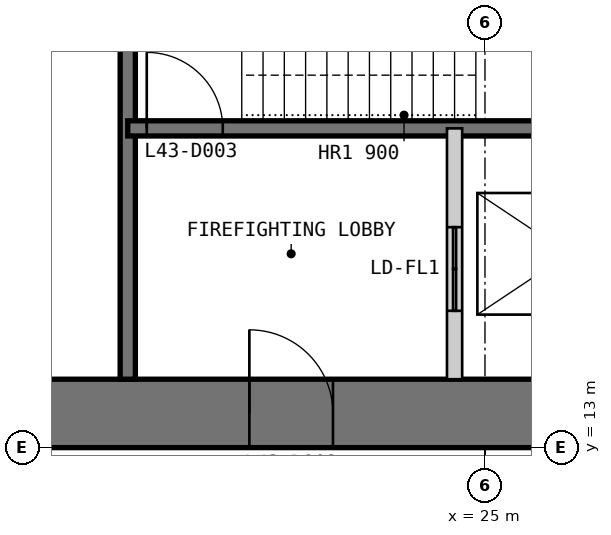
"""IFC4 building model, lengths in metres.
Left out: names, types, materials, properties, quantities, classifications, styles, units other than length and angle.
Written with IfcOpenShell. Run it as: python <this file> out.ifc"""

import sys

from ifc_helpers import new_model, si_unit, direction, frame, frame_2d, origin, place, context, subcontext, project, spatial, polyline, rectangle, outline, extrude, element, fill, save


model = new_model("IFC4")
c1 = context("Model", 3, precision=1e-05, world=origin(), true_north=direction((0.0, 1.0)))
c2 = subcontext(c1, "Body", "Model", "MODEL_VIEW")
j1 = project(units=[si_unit("LENGTHUNIT", "METRE"), si_unit("PLANEANGLEUNIT", "RADIAN")], contexts=[c1])
p1 = place(None, origin())
s1 = spatial("IfcSite", under=j1, at=p1, CompositionType="ELEMENT")
p2 = place(p1, origin())
s2 = spatial("IfcBuilding", under=s1, at=p2, CompositionType="ELEMENT")
p3 = place(p2, frame((0.0, 0.0, 185.8)))
s3 = spatial("IfcBuildingStorey", under=s2, at=p3, CompositionType="ELEMENT", Elevation=185.8)
p4 = place(p3, frame((13.0, 13.45, 0.0), z_axis=(0.0, 0.0, 1.0), x_axis=(1.0, 0.0, 0.0)))
e1 = element("IfcWall", 1, at=p4, inside=s3, PredefinedType="SHEAR", context=c2, shape_type="SweptSolid", body=[
    extrude(outline(polyline([(0.0, -0.45), (24.0, -0.45), (23.1, 0.45), (0.9, 0.45), (0.0, -0.45)])), origin(), (0.0, 0.0, 1.0), 4.0),
])
p5 = place(p4, frame((4.9, 0.0, 0.0)))
e2 = element("IfcOpeningElement", 2, at=p5, cuts=e1, PredefinedType="OPENING", context=c2, shape_type="SweptSolid", body=[
    extrude(rectangle(XDim=1.0, YDim=2.2, at=frame_2d((0.5, 1.1))), frame((0.0, 0.46, 0.0), z_axis=(0.0, -1.0, 0.0), x_axis=(1.0, 0.0, 0.0)), (0.0, 0.0, 1.0), 0.92),
])
p6 = place(p4, frame((8.9, 0.0, 0.0)))
e3 = element("IfcOpeningElement", 3, at=p6, cuts=e1, PredefinedType="OPENING", context=c2, shape_type="SweptSolid", body=[
    extrude(rectangle(XDim=1.1, YDim=2.2, at=frame_2d((0.55, 1.1))), frame((0.0, 0.46, 0.0), z_axis=(0.0, -1.0, 0.0), x_axis=(1.0, 0.0, 0.0)), (0.0, 0.0, 1.0), 0.92),
])
p7 = place(p4, frame((15.05, 0.0, 0.0)))
e4 = element("IfcOpeningElement", 4, at=p7, cuts=e1, PredefinedType="OPENING", context=c2, shape_type="SweptSolid", body=[
    extrude(rectangle(XDim=0.9, YDim=2.2, at=frame_2d((0.45, 1.1))), frame((0.0, 0.46, 0.0), z_axis=(0.0, -1.0, 0.0), x_axis=(1.0, 0.0, 0.0)), (0.0, 0.0, 1.0), 0.92),
])
p8 = place(p4, frame((17.9, 0.0, 0.0)))
e5 = element("IfcOpeningElement", 5, at=p8, cuts=e1, PredefinedType="OPENING", context=c2, shape_type="SweptSolid", body=[
    extrude(rectangle(XDim=1.0, YDim=2.2, at=frame_2d((0.5, 1.1))), frame((0.0, 0.46, 0.0), z_axis=(0.0, -1.0, 0.0), x_axis=(1.0, 0.0, 0.0)), (0.0, 0.0, 1.0), 0.92),
])
p9 = place(p4, frame((21.4, 0.0, 0.0)))
e6 = element("IfcOpeningElement", 6, at=p9, cuts=e1, PredefinedType="OPENING", context=c2, shape_type="SweptSolid", body=[
    extrude(rectangle(XDim=1.0, YDim=2.2, at=frame_2d((0.5, 1.1))), frame((0.0, 0.46, 0.0), z_axis=(0.0, -1.0, 0.0), x_axis=(1.0, 0.0, 0.0)), (0.0, 0.0, 1.0), 0.92),
])
p10 = place(p3, frame((20.3, 13.9, 0.0), z_axis=(0.0, 0.0, 1.0), x_axis=(0.0, 1.0, 0.0)))
e7 = element("IfcWall", 7, at=p10, inside=s3, PredefinedType="SOLIDWALL", context=c2, shape_type="SweptSolid", body=[
    extrude(rectangle(XDim=16.1, YDim=0.2, at=frame_2d((8.05, 0.0))), origin(), (0.0, 0.0, 1.0), 3.8),
])
p11 = place(p10, frame((10.65, 0.0, 0.0)))
e8 = element("IfcOpeningElement", 8, at=p11, cuts=e7, PredefinedType="OPENING", context=c2, shape_type="SweptSolid", body=[
    extrude(rectangle(XDim=0.9, YDim=2.2, at=frame_2d((0.45, 1.1))), frame((0.0, 0.11, 0.0), z_axis=(0.0, -1.0, 0.0), x_axis=(1.0, 0.0, 0.0)), (0.0, 0.0, 1.0), 0.22),
])
p12 = place(p3, frame((20.3, 17.2, 0.0), z_axis=(0.0, 0.0, 1.0), x_axis=(1.0, 0.0, 0.0)))
e9 = element("IfcWall", 9, at=p12, inside=s3, PredefinedType="SOLIDWALL", context=c2, shape_type="SweptSolid", body=[
    extrude(rectangle(XDim=9.4, YDim=0.2, at=frame_2d((4.7, 0.0))), origin(), (0.0, 0.0, 1.0), 3.8),
])
p13 = place(p12, frame((0.25, 0.0, 0.0)))
e10 = element("IfcOpeningElement", 10, at=p13, cuts=e9, PredefinedType="OPENING", context=c2, shape_type="SweptSolid", body=[
    extrude(rectangle(XDim=1.0, YDim=2.2, at=frame_2d((0.5, 1.1))), frame((0.0, 0.11, 0.0), z_axis=(0.0, -1.0, 0.0), x_axis=(1.0, 0.0, 0.0)), (0.0, 0.0, 1.0), 0.22),
])
p14 = place(p3, frame((24.6, 13.9, 0.0), z_axis=(0.0, 0.0, 1.0), x_axis=(0.0, 1.0, 0.0)))
e11 = element("IfcWall", 11, at=p14, inside=s3, PredefinedType="PARTITIONING", context=c2, shape_type="SweptSolid", body=[
    extrude(rectangle(XDim=3.3, YDim=0.2, at=frame_2d((1.65, 0.0))), origin(), (0.0, 0.0, 1.0), 3.8),
])
p15 = place(p14, frame((0.9, 0.0, 0.0)))
e12 = element("IfcOpeningElement", 12, at=p15, cuts=e11, PredefinedType="OPENING", context=c2, shape_type="SweptSolid", body=[
    extrude(rectangle(XDim=1.1, YDim=2.2, at=frame_2d((0.55, 1.1))), frame((0.0, 0.11, 0.0), z_axis=(0.0, -1.0, 0.0), x_axis=(1.0, 0.0, 0.0)), (0.0, 0.0, 1.0), 0.22),
])
p16 = place(p6, origin())
e13 = element("IfcDoor", 13, at=p16, inside=s3, OperationType="SINGLE_SWING_LEFT", PredefinedType="DOOR", context=c2, shape_type="SweptSolid", body=[
    extrude(rectangle(XDim=1.1, YDim=2.2, at=frame_2d((0.55, 1.1))), frame((0.0, 0.025, 0.0), z_axis=(0.0, -1.0, 0.0), x_axis=(1.0, 0.0, 0.0)), (0.0, 0.0, 1.0), 0.05),
    extrude(outline(polyline([(0.0, 0.0), (0.04, 0.0), (0.04, 2.16), (1.06, 2.16), (1.06, 0.0), (1.1, 0.0), (1.1, 2.2), (0.0, 2.2), (0.0, 0.0)])), frame((0.0, 0.3, 0.0), z_axis=(0.0, -1.0, 0.0), x_axis=(1.0, 0.0, 0.0)), (0.0, 0.0, 1.0), 0.6),
])
fill(e3, e13)
p17 = place(p13, origin())
e14 = element("IfcDoor", 14, at=p17, inside=s3, OperationType="SINGLE_SWING_LEFT", PredefinedType="DOOR", context=c2, shape_type="SweptSolid", body=[
    extrude(rectangle(XDim=1.0, YDim=2.2, at=frame_2d((0.5, 1.1))), frame((0.0, 0.025, 0.0), z_axis=(0.0, -1.0, 0.0), x_axis=(1.0, 0.0, 0.0)), (0.0, 0.0, 1.0), 0.05),
])
fill(e10, e14)
p18 = place(p15, origin())
e15 = element("IfcDoor", 15, at=p18, inside=s3, OperationType="DOUBLE_DOOR_SLIDING", PredefinedType="DOOR", context=c2, shape_type="SweptSolid", body=[
    extrude(rectangle(XDim=1.1, YDim=2.2, at=frame_2d((0.55, 1.1))), frame((0.0, 0.025, 0.0), z_axis=(0.0, -1.0, 0.0), x_axis=(1.0, 0.0, 0.0)), (0.0, 0.0, 1.0), 0.05),
])
fill(e12, e15)
save(model, sys.argv[1])
